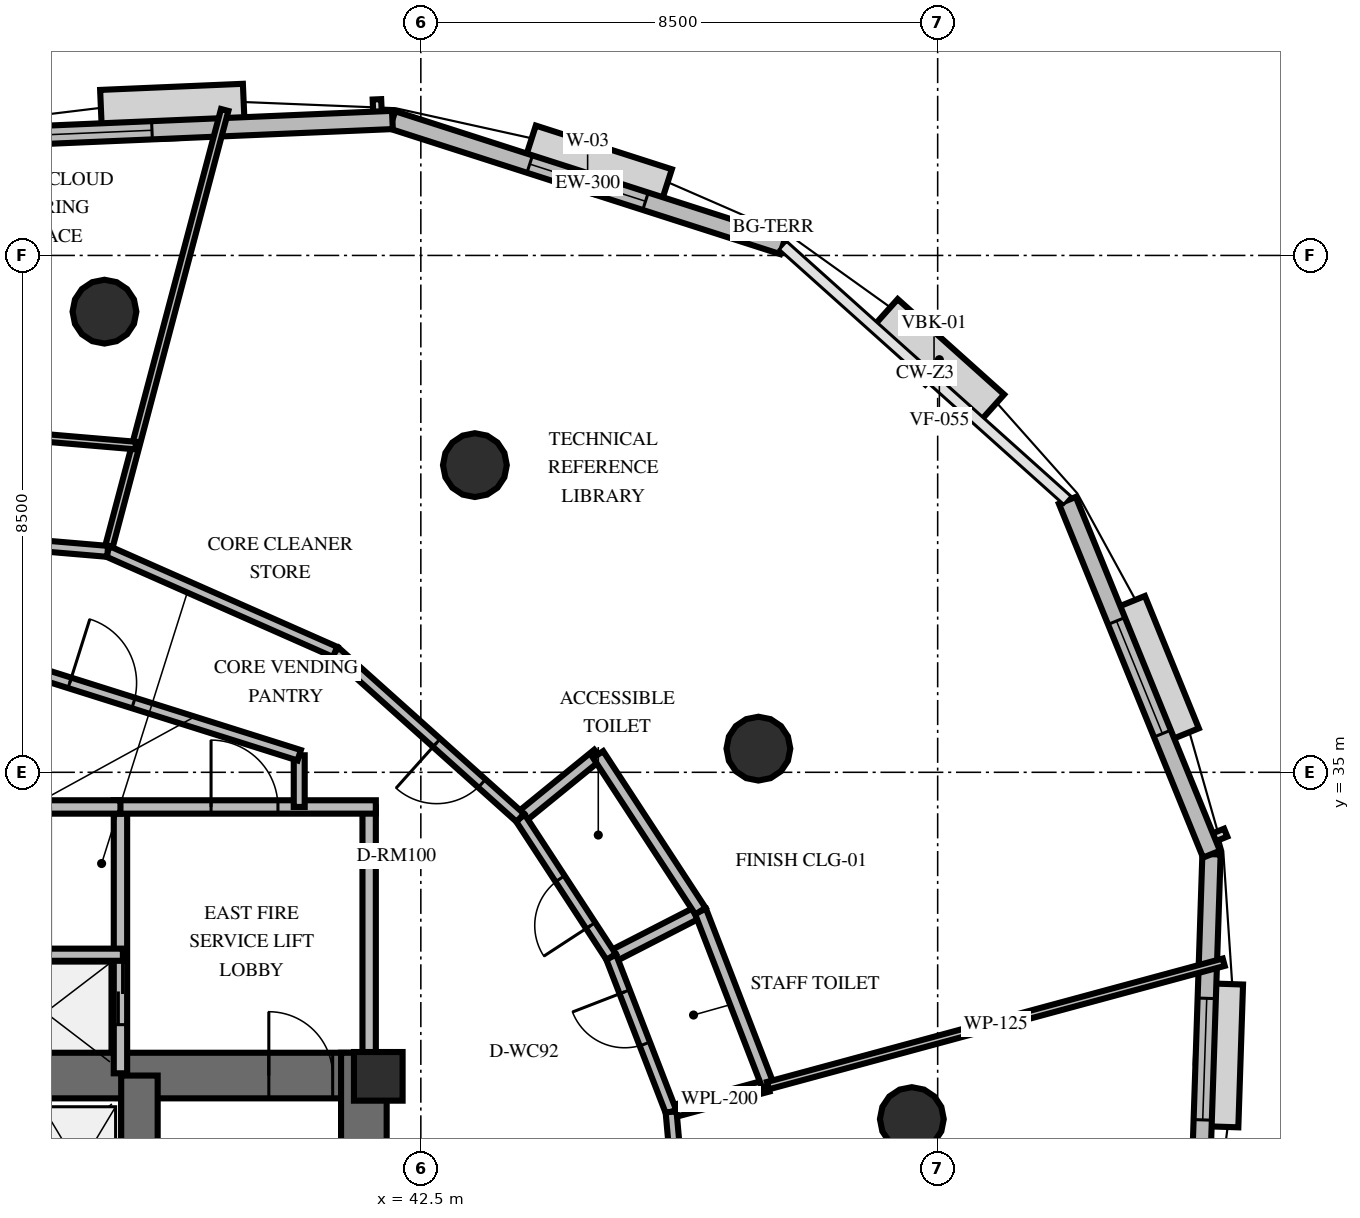
"""IFC4 building model, lengths in metres.
Left out: names, types, materials, properties, quantities, classifications, styles, units other than length and angle.
Written with IfcOpenShell. Run it as: python <this file> out.ifc"""

import sys

from ifc_helpers import new_model, si_unit, direction, frame, frame_2d, origin, origin_2d, place, context, subcontext, project, spatial, rectangle, circle, extrude, element, fill, save


model = new_model("IFC4")
c1 = context("Model", 3, precision=1e-05, world=origin(), true_north=direction((0.0, 1.0)))
c2 = subcontext(c1, "Body", "Model", "MODEL_VIEW")
j1 = project(units=[si_unit("LENGTHUNIT", "METRE"), si_unit("PLANEANGLEUNIT", "RADIAN")], contexts=[c1])
p1 = place(None, origin())
s1 = spatial("IfcSite", under=j1, at=p1, CompositionType="ELEMENT")
p2 = place(p1, origin())
s2 = spatial("IfcBuilding", under=s1, at=p2, CompositionType="ELEMENT")
p3 = place(p2, frame((0.0, 0.0, 180.8)))
s3 = spatial("IfcBuildingStorey", under=s2, at=p3, CompositionType="ELEMENT", Elevation=180.8)
p4 = place(p3, frame((26.072, 30.013, 0.0), z_axis=(0.0, 0.0, 1.0), x_axis=(1.0, 0.0, 0.0)))
e1 = element("IfcWall", 1, at=p4, inside=s3, PredefinedType="SHEAR", context=c2, shape_type="SweptSolid", body=[
    extrude(rectangle(XDim=15.866, YDim=0.75, at=frame_2d((7.933, 0.0))), origin(), (0.0, 0.0, 1.0), 3.6),
])
p5 = place(p4, frame((0.878, 0.0, 0.0)))
e2 = element("IfcOpeningElement", 2, at=p5, cuts=e1, PredefinedType="OPENING", context=c2, shape_type="SweptSolid", body=[
    extrude(rectangle(XDim=1.05, YDim=2.15, at=frame_2d((0.525, 1.075))), frame((0.0, 0.385, 0.0), z_axis=(0.0, -1.0, 0.0), x_axis=(1.0, 0.0, 0.0)), (0.0, 0.0, 1.0), 0.77),
])
p6 = place(p4, frame((13.928, 0.0, 0.0)))
e3 = element("IfcOpeningElement", 3, at=p6, cuts=e1, PredefinedType="OPENING", context=c2, shape_type="SweptSolid", body=[
    extrude(rectangle(XDim=1.05, YDim=2.15, at=frame_2d((0.525, 1.075))), frame((0.0, 0.385, 0.0), z_axis=(0.0, -1.0, 0.0), x_axis=(1.0, 0.0, 0.0)), (0.0, 0.0, 1.0), 0.77),
])
p7 = place(p4, frame((7.378, 0.0, 0.0)))
e4 = element("IfcOpeningElement", 4, at=p7, cuts=e1, PredefinedType="OPENING", context=c2, shape_type="SweptSolid", body=[
    extrude(rectangle(XDim=1.1, YDim=2.15, at=frame_2d((0.55, 1.075))), frame((0.0, 0.385, 0.0), z_axis=(0.0, -1.0, 0.0), x_axis=(1.0, 0.0, 0.0)), (0.0, 0.0, 1.0), 0.77),
])
p8 = place(p3, frame((41.563, 19.812, 0.0), z_axis=(0.0, 0.0, 1.0), x_axis=(0.0, 1.0, 0.0)))
e5 = element("IfcWall", 5, at=p8, inside=s3, PredefinedType="SHEAR", context=c2, shape_type="SweptSolid", body=[
    extrude(rectangle(XDim=10.576, YDim=0.75, at=frame_2d((5.288, 0.0))), origin(), (0.0, 0.0, 1.0), 3.6),
])
p9 = place(p3, frame((37.872, 20.187, 0.0), z_axis=(0.0, 0.0, 1.0), x_axis=(0.0, 1.0, 0.0)))
e6 = element("IfcWall", 6, at=p9, inside=s3, PredefinedType="SHEAR", context=c2, shape_type="SweptSolid", body=[
    extrude(rectangle(XDim=9.826, YDim=0.6, at=frame_2d((4.913, 0.0))), origin(), (0.0, 0.0, 1.0), 3.6),
])
p10 = place(p3, frame((41.8, 30.0, 0.0), z_axis=(0.0, 0.0, 1.0), x_axis=(1.0, 0.0, 0.0)))
e7 = element("IfcColumn", 7, at=p10, inside=s3, PredefinedType="PILASTER", context=c2, shape_type="SweptSolid", body=[
    extrude(rectangle(XDim=0.8, YDim=0.8, at=origin_2d()), origin(), (0.0, 0.0, 1.0), 3.6),
])
for number, where, z_axis, x_axis in (
    (8, (50.575, 29.297, 0.0), (0.0, 0.0, 1.0), (1.0, 0.0, 0.0)),
    (9, (48.052, 35.389, 0.0), (0.0, 0.0, 1.0), (1.0, 0.0, 0.0)),
    (10, (43.389, 40.052, 0.0), (0.0, 0.0, 1.0), (1.0, 0.0, 0.0)),
    (11, (37.297, 42.575, 0.0), (0.0, 0.0, 1.0), (1.0, 0.0, 0.0)),
):
    element("IfcColumn", number, at=place(p3, frame(where, z_axis=z_axis, x_axis=x_axis)), inside=s3, PredefinedType="COLUMN", context=c2, shape_type="SweptSolid", body=[
        extrude(circle(Radius=0.525, at=origin_2d()), origin(), (0.0, 0.0, 1.0), 3.6),
    ])
p11 = place(p3, frame((48.455, 43.665, 0.0), z_axis=(0.0, 0.0, 1.0), x_axis=(-0.952093689629, 0.305806484838, 0.0)))
e12 = element("IfcWall", 12, at=p11, inside=s3, PredefinedType="SOLIDWALL", context=c2, shape_type="SweptSolid", body=[
    extrude(rectangle(XDim=6.745, YDim=0.3, at=frame_2d((3.373, 0.0))), origin(), (0.0, 0.0, 1.0), 2.66),
])
p12 = place(p11, frame((2.373, 0.0, 0.8)))
e13 = element("IfcOpeningElement", 13, at=p12, cuts=e12, PredefinedType="OPENING", context=c2, shape_type="SweptSolid", body=[
    extrude(rectangle(XDim=2.0, YDim=1.85, at=frame_2d((1.0, 0.925))), frame((0.0, 0.16, 0.0), z_axis=(0.0, -1.0, 0.0), x_axis=(1.0, 0.0, 0.0)), (0.0, 0.0, 1.0), 0.32),
])
p13 = place(p3, frame((42.032, 45.728, 0.0), z_axis=(0.0, 0.0, 1.0), x_axis=(-0.999082008159, -0.042838545408, 0.0)))
e14 = element("IfcWall", 14, at=p13, inside=s3, PredefinedType="SOLIDWALL", context=c2, shape_type="SweptSolid", body=[
    extrude(rectangle(XDim=7.397, YDim=0.3, at=frame_2d((3.699, 0.0))), origin(), (0.0, 0.0, 1.0), 2.66),
])
p14 = place(p13, frame((3.958, 0.0, 0.8)))
e15 = element("IfcOpeningElement", 15, at=p14, cuts=e14, PredefinedType="OPENING", context=c2, shape_type="SweptSolid", body=[
    extrude(rectangle(XDim=2.0, YDim=1.85, at=frame_2d((1.0, 0.925))), frame((0.0, 0.16, 0.0), z_axis=(0.0, -1.0, 0.0), x_axis=(1.0, 0.0, 0.0)), (0.0, 0.0, 1.0), 0.32),
])
p15 = place(p3, frame((55.281, 26.912, 0.0), z_axis=(0.0, 0.0, 1.0), x_axis=(0.033009922207, 0.999455024019, 0.0)))
e16 = element("IfcWall", 16, at=p15, inside=s3, PredefinedType="SOLIDWALL", context=c2, shape_type="SweptSolid", body=[
    extrude(rectangle(XDim=6.745, YDim=0.3, at=frame_2d((3.373, 0.0))), origin(), (0.0, 0.0, 1.0), 2.66),
])
p16 = place(p15, frame((2.373, 0.0, 0.8)))
e17 = element("IfcOpeningElement", 17, at=p16, cuts=e16, PredefinedType="OPENING", context=c2, shape_type="SweptSolid", body=[
    extrude(rectangle(XDim=2.0, YDim=1.85, at=frame_2d((1.0, 0.925))), frame((0.0, 0.16, 0.0), z_axis=(0.0, -1.0, 0.0), x_axis=(1.0, 0.0, 0.0)), (0.0, 0.0, 1.0), 0.32),
])
p17 = place(p3, frame((55.504, 33.654, 0.0), z_axis=(0.0, 0.0, 1.0), x_axis=(-0.377332684147, 0.926077775068, 0.0)))
e18 = element("IfcWall", 18, at=p17, inside=s3, PredefinedType="SOLIDWALL", context=c2, shape_type="SweptSolid", body=[
    extrude(rectangle(XDim=6.282, YDim=0.3, at=frame_2d((3.141, 0.0))), origin(), (0.0, 0.0, 1.0), 2.66),
])
p18 = place(p17, frame((2.141, 0.0, 0.8)))
e19 = element("IfcOpeningElement", 19, at=p18, cuts=e18, PredefinedType="OPENING", context=c2, shape_type="SweptSolid", body=[
    extrude(rectangle(XDim=2.0, YDim=1.85, at=frame_2d((1.0, 0.925))), frame((0.0, 0.16, 0.0), z_axis=(0.0, -1.0, 0.0), x_axis=(1.0, 0.0, 0.0)), (0.0, 0.0, 1.0), 0.32),
])
p19 = place(p3, frame((37.56, 30.05, 0.0), z_axis=(0.0, 0.0, 1.0), x_axis=(0.0, 1.0, 0.0)))
e20 = element("IfcWall", 20, at=p19, inside=s3, PredefinedType="SOLIDWALL", context=c2, shape_type="SweptSolid", body=[
    extrude(rectangle(XDim=4.38, YDim=0.22, at=frame_2d((2.19, 0.0))), origin(), (0.0, 0.0, 1.0), 2.46),
])
p20 = place(p19, frame((0.8, 0.0, 0.0)))
e21 = element("IfcOpeningElement", 21, at=p20, cuts=e20, PredefinedType="OPENING", context=c2, shape_type="SweptSolid", body=[
    extrude(rectangle(XDim=1.05, YDim=2.1, at=frame_2d((0.525, 1.05))), frame((0.0, 0.12, 0.0), z_axis=(0.0, -1.0, 0.0), x_axis=(1.0, 0.0, 0.0)), (0.0, 0.0, 1.0), 0.24),
])
p21 = place(p3, frame((41.65, 30.05, 0.0), z_axis=(0.0, 0.0, 1.0), x_axis=(0.0, 1.0, 0.0)))
e22 = element("IfcWall", 22, at=p21, inside=s3, PredefinedType="SOLIDWALL", context=c2, shape_type="SweptSolid", body=[
    extrude(rectangle(XDim=4.38, YDim=0.22, at=frame_2d((2.19, 0.0))), origin(), (0.0, 0.0, 1.0), 2.46),
])
p22 = place(p3, frame((37.45, 34.43, 0.0), z_axis=(0.0, 0.0, 1.0), x_axis=(1.0, 0.0, 0.0)))
e23 = element("IfcWall", 23, at=p22, inside=s3, PredefinedType="SOLIDWALL", context=c2, shape_type="SweptSolid", body=[
    extrude(rectangle(XDim=4.31, YDim=0.22, at=frame_2d((2.155, 0.0))), origin(), (0.0, 0.0, 1.0), 2.46),
])
p23 = place(p22, frame((1.6, 0.0, 0.0)))
e24 = element("IfcOpeningElement", 24, at=p23, cuts=e23, PredefinedType="OPENING", context=c2, shape_type="SweptSolid", body=[
    extrude(rectangle(XDim=1.1, YDim=2.15, at=frame_2d((0.55, 1.075))), frame((0.0, 0.12, 0.0), z_axis=(0.0, -1.0, 0.0), x_axis=(1.0, 0.0, 0.0)), (0.0, 0.0, 1.0), 0.24),
])
p24 = place(p3, frame((35.05, 32.0, 0.0), z_axis=(0.0, 0.0, 1.0), x_axis=(1.0, 0.0, 0.0)))
e25 = element("IfcWall", 25, at=p24, inside=s3, PredefinedType="SOLIDWALL", context=c2, shape_type="SweptSolid", body=[
    extrude(rectangle(XDim=2.55, YDim=0.2, at=frame_2d((1.275, 0.0))), origin(), (0.0, 0.0, 1.0), 2.46),
])
p25 = place(p3, frame((30.44, 34.43, 0.0), z_axis=(0.0, 0.0, 1.0), x_axis=(1.0, 0.0, 0.0)))
e26 = element("IfcWall", 26, at=p25, inside=s3, PredefinedType="SOLIDWALL", context=c2, shape_type="SweptSolid", body=[
    extrude(rectangle(XDim=7.12, YDim=0.22, at=frame_2d((3.56, 0.0))), origin(), (0.0, 0.0, 1.0), 2.46),
])
p26 = place(p25, frame((3.01, 0.0, 0.0)))
e27 = element("IfcOpeningElement", 27, at=p26, cuts=e26, PredefinedType="OPENING", context=c2, shape_type="SweptSolid", body=[
    extrude(rectangle(XDim=1.1, YDim=2.15, at=frame_2d((0.55, 1.075))), frame((0.0, 0.12, 0.0), z_axis=(0.0, -1.0, 0.0), x_axis=(1.0, 0.0, 0.0)), (0.0, 0.0, 1.0), 0.24),
])
p27 = place(p3, frame((40.5, 35.28, 0.0), z_axis=(0.0, 0.0, 1.0), x_axis=(0.0, -1.0, 0.0)))
e28 = element("IfcWall", 28, at=p27, inside=s3, PredefinedType="PARTITIONING", context=c2, shape_type="SweptSolid", body=[
    extrude(rectangle(XDim=0.85, YDim=0.18, at=frame_2d((0.425, 0.0))), origin(), (0.0, 0.0, 1.0), 2.46),
])
p28 = place(p3, frame((34.0, 37.33, 0.0), z_axis=(0.0, 0.0, 1.0), x_axis=(0.953691418528, -0.300786765376, 0.0)))
e29 = element("IfcWall", 29, at=p28, inside=s3, PredefinedType="PARTITIONING", context=c2, shape_type="SweptSolid", body=[
    extrude(rectangle(XDim=6.816, YDim=0.18, at=frame_2d((3.408, 0.0))), origin(), (0.0, 0.0, 1.0), 2.46),
])
p29 = place(p28, frame((2.858, 0.0, 0.0)))
e30 = element("IfcOpeningElement", 30, at=p29, cuts=e29, PredefinedType="OPENING", context=c2, shape_type="SweptSolid", body=[
    extrude(rectangle(XDim=1.1, YDim=2.15, at=frame_2d((0.55, 1.075))), frame((0.0, 0.1, 0.0), z_axis=(0.0, -1.0, 0.0), x_axis=(1.0, 0.0, 0.0)), (0.0, 0.0, 1.0), 0.2),
])
for number, where, z_axis, x_axis in (
    (31, (46.616, 29.416, 0.0), (0.0, 0.0, 1.0), (0.965, 0.261, 0.0)),
    (32, (45.63, 31.964, 0.0), (0.0, 0.0, 1.0), (0.89, 0.456, 0.0)),
):
    element("IfcWall", number, at=place(p3, frame(where, z_axis=z_axis, x_axis=x_axis)), inside=s3, PredefinedType="PLUMBINGWALL", context=c2, shape_type="SweptSolid", body=[
        extrude(rectangle(XDim=1.65, YDim=0.2, at=frame_2d((0.825, 0.0))), origin(), (0.0, 0.0, 1.0), 2.46),
    ])
p30 = place(p3, frame((48.208, 29.847, 0.0), z_axis=(0.0, 0.0, 1.0), x_axis=(-0.360807141902, 0.932640448593, 0.0)))
e33 = element("IfcWall", 33, at=p30, inside=s3, PredefinedType="PLUMBINGWALL", context=c2, shape_type="SweptSolid", body=[
    extrude(rectangle(XDim=3.077, YDim=0.2, at=frame_2d((1.539, 0.0))), origin(), (0.0, 0.0, 1.0), 2.46),
])
p31 = place(p3, frame((46.616, 29.416, 0.0), z_axis=(0.0, 0.0, 1.0), x_axis=(-0.360798574026, 0.932643763171, 0.0)))
e34 = element("IfcWall", 34, at=p31, inside=s3, PredefinedType="PARTITIONING", context=c2, shape_type="SweptSolid", body=[
    extrude(rectangle(XDim=2.732, YDim=0.18, at=frame_2d((1.366, 0.0))), origin(), (0.0, 0.0, 1.0), 2.46),
])
p32 = place(p31, frame((1.197, 0.0, 0.0)))
e35 = element("IfcOpeningElement", 35, at=p32, cuts=e34, PredefinedType="OPENING", context=c2, shape_type="SweptSolid", body=[
    extrude(rectangle(XDim=0.92, YDim=2.1, at=frame_2d((0.46, 1.05))), frame((0.0, 0.1, 0.0), z_axis=(0.0, -1.0, 0.0), x_axis=(1.0, 0.0, 0.0)), (0.0, 0.0, 1.0), 0.2),
])
p33 = place(p3, frame((44.136, 34.252, 0.0), z_axis=(0.0, 0.0, 1.0), x_axis=(0.775484501566, 0.631366603354, 0.0)))
e36 = element("IfcWall", 36, at=p33, inside=s3, PredefinedType="PLUMBINGWALL", context=c2, shape_type="SweptSolid", body=[
    extrude(rectangle(XDim=1.65, YDim=0.2, at=frame_2d((0.825, 0.0))), origin(), (0.0, 0.0, 1.0), 2.46),
])
p34 = place(p3, frame((47.098, 32.717, 0.0), z_axis=(0.0, 0.0, 1.0), x_axis=(-0.546858135032, 0.837225286377, 0.0)))
e37 = element("IfcWall", 37, at=p34, inside=s3, PredefinedType="PLUMBINGWALL", context=c2, shape_type="SweptSolid", body=[
    extrude(rectangle(XDim=3.077, YDim=0.2, at=frame_2d((1.539, 0.0))), origin(), (0.0, 0.0, 1.0), 2.46),
])
p35 = place(p3, frame((45.63, 31.964, 0.0), z_axis=(0.0, 0.0, 1.0), x_axis=(-0.546840033284, 0.837237109783, 0.0)))
e38 = element("IfcWall", 38, at=p35, inside=s3, PredefinedType="PARTITIONING", context=c2, shape_type="SweptSolid", body=[
    extrude(rectangle(XDim=2.732, YDim=0.18, at=frame_2d((1.366, 0.0))), origin(), (0.0, 0.0, 1.0), 2.46),
])
p36 = place(p35, frame((0.616, 0.0, 0.0)))
e39 = element("IfcOpeningElement", 39, at=p36, cuts=e38, PredefinedType="OPENING", context=c2, shape_type="SweptSolid", body=[
    extrude(rectangle(XDim=0.92, YDim=2.1, at=frame_2d((0.46, 1.05))), frame((0.0, 0.1, 0.0), z_axis=(0.0, -1.0, 0.0), x_axis=(1.0, 0.0, 0.0)), (0.0, 0.0, 1.0), 0.2),
])
p37 = place(p3, frame((48.208, 29.847, 0.0), z_axis=(0.0, 0.0, 1.0), x_axis=(0.965239591232, 0.26136666107, 0.0)))
e40 = element("IfcWall", 40, at=p37, inside=s3, PredefinedType="PARTITIONING", context=c2, shape_type="SweptSolid", body=[
    extrude(rectangle(XDim=7.766, YDim=0.125, at=frame_2d((3.883, 0.0))), origin(), (0.0, 0.0, 1.0), 2.46),
])
p38 = place(p3, frame((37.35, 38.634, 0.0), z_axis=(0.0, 0.0, 1.0), x_axis=(0.256318782517, 0.966592303781, 0.0)))
e41 = element("IfcWall", 41, at=p38, inside=s3, PredefinedType="PARTITIONING", context=c2, shape_type="SweptSolid", body=[
    extrude(rectangle(XDim=7.51, YDim=0.125, at=frame_2d((3.755, 0.0))), origin(), (0.0, 0.0, 1.0), 2.46),
])
p39 = place(p3, frame((44.136, 34.252, 0.0), z_axis=(0.0, 0.0, 1.0), x_axis=(-0.74490394687, 0.667171724474, 0.0)))
e42 = element("IfcWall", 42, at=p39, inside=s3, PredefinedType="PARTITIONING", context=c2, shape_type="SweptSolid", body=[
    extrude(rectangle(XDim=4.089, YDim=0.18, at=frame_2d((2.045, 0.0))), origin(), (0.0, 0.0, 1.0), 2.46),
])
p40 = place(p39, frame((0.847, 0.0, 0.0)))
e43 = element("IfcOpeningElement", 43, at=p40, cuts=e42, PredefinedType="OPENING", context=c2, shape_type="SweptSolid", body=[
    extrude(rectangle(XDim=1.0, YDim=2.15, at=frame_2d((0.5, 1.075))), frame((0.0, 0.1, 0.0), z_axis=(0.0, -1.0, 0.0), x_axis=(1.0, 0.0, 0.0)), (0.0, 0.0, 1.0), 0.2),
])
p41 = place(p3, frame((41.09, 36.98, 0.0), z_axis=(0.0, 0.0, 1.0), x_axis=(-0.914595215727, 0.404370611406, 0.0)))
e44 = element("IfcWall", 44, at=p41, inside=s3, PredefinedType="PARTITIONING", context=c2, shape_type="SweptSolid", body=[
    extrude(rectangle(XDim=4.089, YDim=0.18, at=frame_2d((2.044, 0.0))), origin(), (0.0, 0.0, 1.0), 2.46),
])
p42 = place(p3, frame((37.35, 38.634, 0.0), z_axis=(0.0, 0.0, 1.0), x_axis=(-0.996423393866, 0.084501006843, 0.0)))
e45 = element("IfcWall", 45, at=p42, inside=s3, PredefinedType="PARTITIONING", context=c2, shape_type="SweptSolid", body=[
    extrude(rectangle(XDim=4.539, YDim=0.18, at=frame_2d((2.27, 0.0))), origin(), (0.0, 0.0, 1.0), 2.46),
])
p43 = place(p42, frame((2.467, 0.0, 0.0)))
e46 = element("IfcOpeningElement", 46, at=p43, cuts=e45, PredefinedType="OPENING", context=c2, shape_type="SweptSolid", body=[
    extrude(rectangle(XDim=1.15, YDim=2.15, at=frame_2d((0.575, 1.075))), frame((0.0, 0.1, 0.0), z_axis=(0.0, -1.0, 0.0), x_axis=(1.0, 0.0, 0.0)), (0.0, 0.0, 1.0), 0.2),
])
p44 = place(p3, frame((37.811, 40.373, 0.0), z_axis=(0.0, 0.0, 1.0), x_axis=(-0.996417104381, 0.084575138764, 0.0)))
e47 = element("IfcWall", 47, at=p44, inside=s3, PredefinedType="PARTITIONING", context=c2, shape_type="SweptSolid", body=[
    extrude(rectangle(XDim=5.164, YDim=0.125, at=frame_2d((2.582, 0.0))), origin(), (0.0, 0.0, 1.0), 2.46),
])
p45 = place(p44, frame((3.071, 0.0, 0.0)))
e48 = element("IfcOpeningElement", 48, at=p45, cuts=e47, PredefinedType="OPENING", context=c2, shape_type="SweptSolid", body=[
    extrude(rectangle(XDim=0.95, YDim=2.15, at=frame_2d((0.475, 1.075))), frame((0.0, 0.073, 0.0), z_axis=(0.0, -1.0, 0.0), x_axis=(1.0, 0.0, 0.0)), (0.0, 0.0, 1.0), 0.145),
])
p46 = place(p3, frame((47.023, 24.895, 0.0), z_axis=(0.0, 0.0, 1.0), x_axis=(-0.089769483635, 0.995962569481, 0.0)))
e49 = element("IfcWall", 49, at=p46, inside=s3, PredefinedType="PARTITIONING", context=c2, shape_type="SweptSolid", body=[
    extrude(rectangle(XDim=4.539, YDim=0.18, at=frame_2d((2.27, 0.0))), origin(), (0.0, 0.0, 1.0), 2.46),
])
p47 = place(p46, frame((0.96, 0.0, 0.0)))
e50 = element("IfcOpeningElement", 50, at=p47, cuts=e49, PredefinedType="OPENING", context=c2, shape_type="SweptSolid", body=[
    extrude(rectangle(XDim=1.0, YDim=2.15, at=frame_2d((0.5, 1.075))), frame((0.0, 0.1, 0.0), z_axis=(0.0, -1.0, 0.0), x_axis=(1.0, 0.0, 0.0)), (0.0, 0.0, 1.0), 0.2),
])
p48 = place(p12, origin())
e51 = element("IfcWindow", 51, at=p48, inside=s3, PartitioningType="SINGLE_PANEL", PredefinedType="WINDOW", context=c2, shape_type="SweptSolid", body=[
    extrude(rectangle(XDim=2.0, YDim=1.85, at=frame_2d((1.0, 0.925))), frame((0.0, 0.03, 0.0), z_axis=(0.0, -1.0, 0.0), x_axis=(1.0, 0.0, 0.0)), (0.0, 0.0, 1.0), 0.06),
])
fill(e13, e51)
p49 = place(p14, origin())
e52 = element("IfcWindow", 52, at=p49, inside=s3, PartitioningType="SINGLE_PANEL", PredefinedType="WINDOW", context=c2, shape_type="SweptSolid", body=[
    extrude(rectangle(XDim=2.0, YDim=1.85, at=frame_2d((1.0, 0.925))), frame((0.0, 0.03, 0.0), z_axis=(0.0, -1.0, 0.0), x_axis=(1.0, 0.0, 0.0)), (0.0, 0.0, 1.0), 0.06),
])
fill(e15, e52)
p50 = place(p16, origin())
e53 = element("IfcWindow", 53, at=p50, inside=s3, PartitioningType="SINGLE_PANEL", PredefinedType="WINDOW", context=c2, shape_type="SweptSolid", body=[
    extrude(rectangle(XDim=2.0, YDim=1.85, at=frame_2d((1.0, 0.925))), frame((0.0, 0.03, 0.0), z_axis=(0.0, -1.0, 0.0), x_axis=(1.0, 0.0, 0.0)), (0.0, 0.0, 1.0), 0.06),
])
fill(e17, e53)
p51 = place(p18, origin())
e54 = element("IfcWindow", 54, at=p51, inside=s3, PartitioningType="SINGLE_PANEL", PredefinedType="WINDOW", context=c2, shape_type="SweptSolid", body=[
    extrude(rectangle(XDim=2.0, YDim=1.85, at=frame_2d((1.0, 0.925))), frame((0.0, 0.03, 0.0), z_axis=(0.0, -1.0, 0.0), x_axis=(1.0, 0.0, 0.0)), (0.0, 0.0, 1.0), 0.06),
])
fill(e19, e54)
p52 = place(p6, origin())
e55 = element("IfcDoor", 55, at=p52, inside=s3, OperationType="SINGLE_SWING_LEFT", PredefinedType="DOOR", context=c2, shape_type="SweptSolid", body=[
    extrude(rectangle(XDim=1.05, YDim=2.15, at=frame_2d((0.525, 1.075))), frame((0.0, 0.025, 0.0), z_axis=(0.0, -1.0, 0.0), x_axis=(1.0, 0.0, 0.0)), (0.0, 0.0, 1.0), 0.05),
])
fill(e3, e55)
p53 = place(p23, origin())
e56 = element("IfcDoor", 56, at=p53, inside=s3, OperationType="SINGLE_SWING_LEFT", PredefinedType="DOOR", context=c2, shape_type="SweptSolid", body=[
    extrude(rectangle(XDim=1.1, YDim=2.15, at=frame_2d((0.55, 1.075))), frame((0.0, 0.025, 0.0), z_axis=(0.0, -1.0, 0.0), x_axis=(1.0, 0.0, 0.0)), (0.0, 0.0, 1.0), 0.05),
])
fill(e24, e56)
p54 = place(p20, origin())
e57 = element("IfcDoor", 57, at=p54, inside=s3, OperationType="DOUBLE_DOOR_SLIDING", PredefinedType="USERDEFINED", context=c2, shape_type="SweptSolid", body=[
    extrude(rectangle(XDim=1.05, YDim=2.1, at=frame_2d((0.525, 1.05))), frame((0.0, 0.025, 0.0), z_axis=(0.0, -1.0, 0.0), x_axis=(1.0, 0.0, 0.0)), (0.0, 0.0, 1.0), 0.05),
])
fill(e21, e57)
p55 = place(p29, origin())
e58 = element("IfcDoor", 58, at=p55, inside=s3, OperationType="SINGLE_SWING_LEFT", PredefinedType="DOOR", context=c2, shape_type="SweptSolid", body=[
    extrude(rectangle(XDim=1.1, YDim=2.15, at=frame_2d((0.55, 1.075))), frame((0.0, 0.025, 0.0), z_axis=(0.0, -1.0, 0.0), x_axis=(1.0, 0.0, 0.0)), (0.0, 0.0, 1.0), 0.05),
])
fill(e30, e58)
p56 = place(p32, origin())
e59 = element("IfcDoor", 59, at=p56, inside=s3, OperationType="SINGLE_SWING_RIGHT", PredefinedType="DOOR", context=c2, shape_type="SweptSolid", body=[
    extrude(rectangle(XDim=0.92, YDim=2.1, at=frame_2d((0.46, 1.05))), frame((0.0, 0.025, 0.0), z_axis=(0.0, -1.0, 0.0), x_axis=(1.0, 0.0, 0.0)), (0.0, 0.0, 1.0), 0.05),
])
fill(e35, e59)
p57 = place(p36, origin())
e60 = element("IfcDoor", 60, at=p57, inside=s3, OperationType="SINGLE_SWING_LEFT", PredefinedType="DOOR", context=c2, shape_type="SweptSolid", body=[
    extrude(rectangle(XDim=0.92, YDim=2.1, at=frame_2d((0.46, 1.05))), frame((0.0, 0.025, 0.0), z_axis=(0.0, -1.0, 0.0), x_axis=(1.0, 0.0, 0.0)), (0.0, 0.0, 1.0), 0.05),
])
fill(e39, e60)
p58 = place(p40, origin())
e61 = element("IfcDoor", 61, at=p58, inside=s3, OperationType="SINGLE_SWING_RIGHT", PredefinedType="DOOR", context=c2, shape_type="SweptSolid", body=[
    extrude(rectangle(XDim=1.0, YDim=2.15, at=frame_2d((0.5, 1.075))), frame((0.0, 0.025, 0.0), z_axis=(0.0, -1.0, 0.0), x_axis=(1.0, 0.0, 0.0)), (0.0, 0.0, 1.0), 0.05),
])
fill(e43, e61)
save(model, sys.argv[1])
